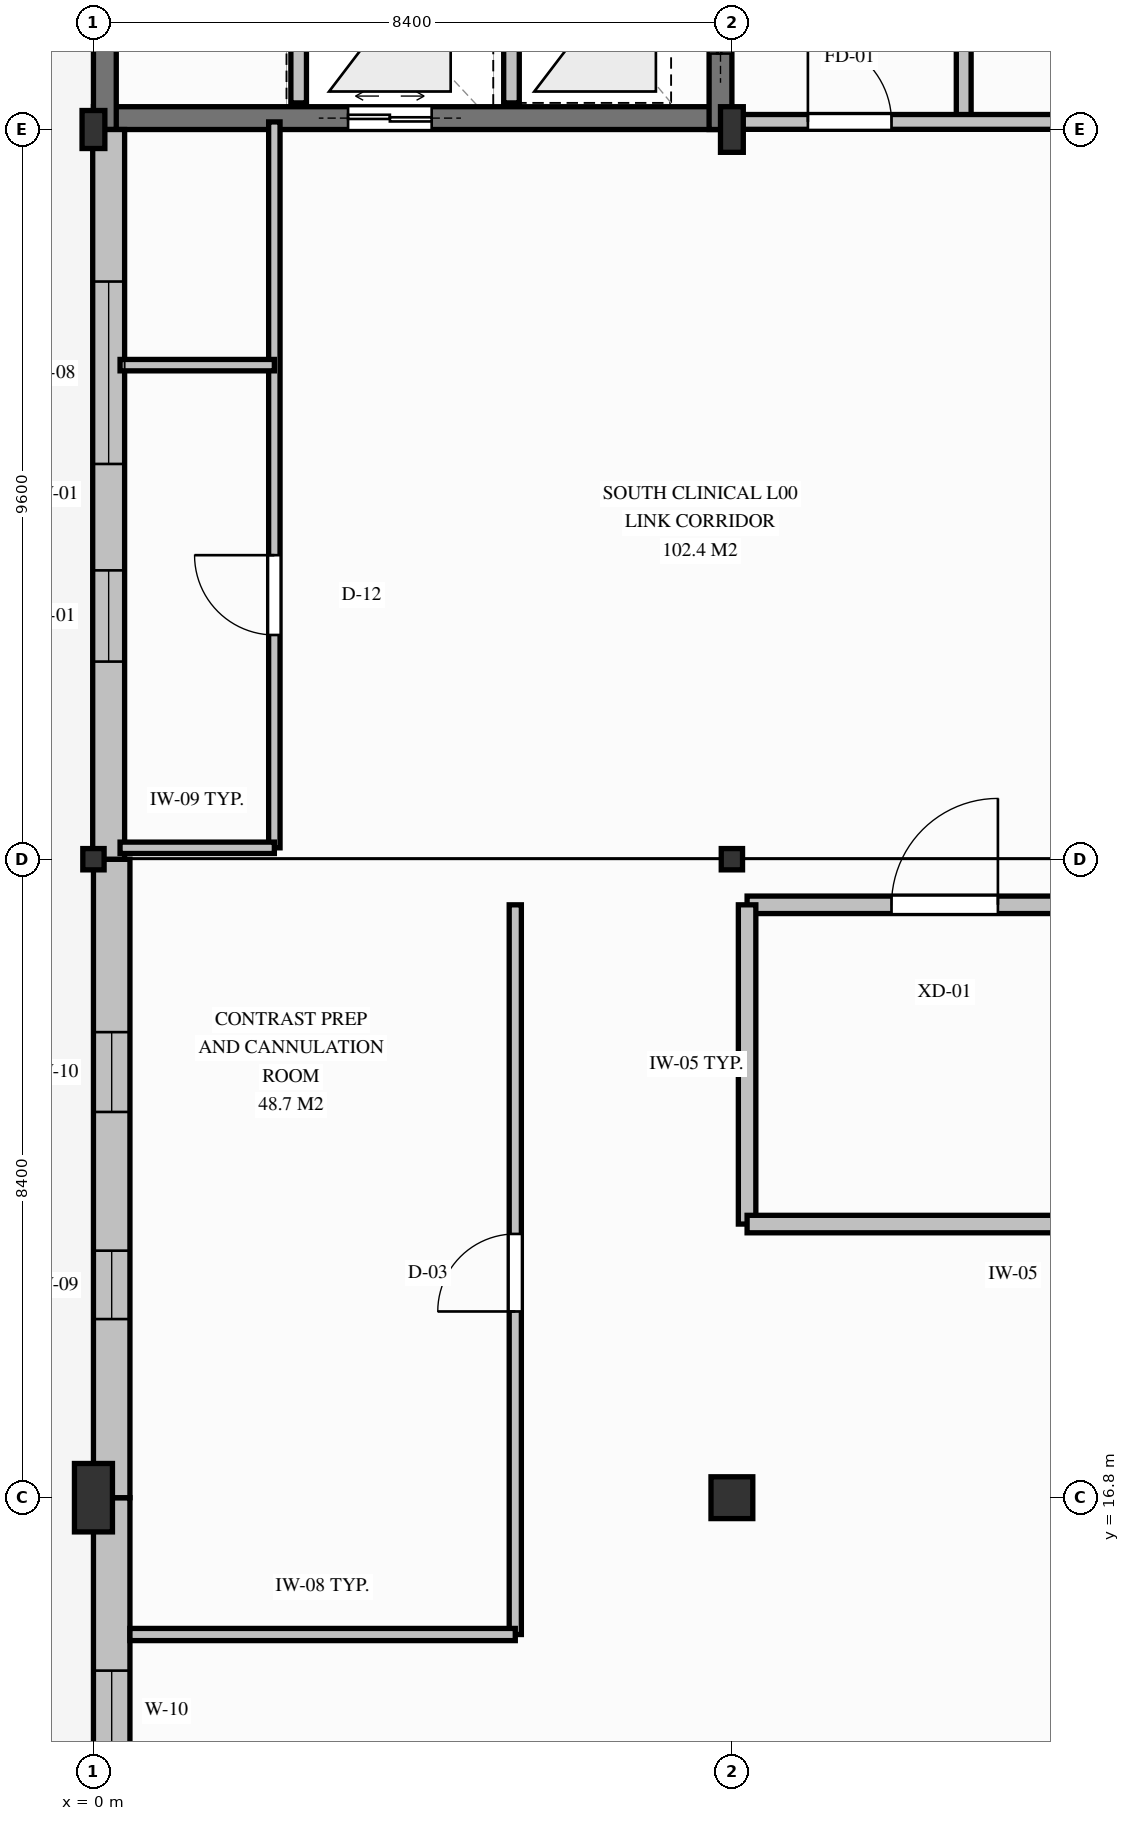
"""IFC4 building model, lengths in metres.
Left out: names, types, materials, properties, quantities, classifications, styles, units other than length and angle.
Written with IfcOpenShell. Run it as: python <this file> out.ifc"""

import sys

from ifc_helpers import new_model, si_unit, direction, frame, frame_2d, origin, origin_2d, place, context, subcontext, project, spatial, rectangle, circle, i_section, extrude, element, fill, save


model = new_model("IFC4")
c1 = context("Model", 3, precision=1e-05, world=origin(), true_north=direction((0.0, 1.0)))
c2 = subcontext(c1, "Body", "Model", "MODEL_VIEW")
j1 = project(units=[si_unit("LENGTHUNIT", "METRE"), si_unit("PLANEANGLEUNIT", "RADIAN")], contexts=[c1])
p1 = place(None, origin())
s1 = spatial("IfcSite", under=j1, at=p1, CompositionType="ELEMENT")
p2 = place(p1, origin())
s2 = spatial("IfcBuilding", under=s1, at=p2, CompositionType="ELEMENT")
p3 = place(p2, origin())
s3 = spatial("IfcBuildingStorey", under=s2, at=p3, CompositionType="ELEMENT", Elevation=0.0)
p4 = place(p3, frame((0.0, 34.95, 0.0), z_axis=(0.0, 0.0, 1.0), x_axis=(1.0, 0.0, 0.0)))
e1 = element("IfcWall", 1, at=p4, inside=s3, PredefinedType="SHEAR", context=c2, shape_type="SweptSolid", body=[
    extrude(rectangle(XDim=8.4, YDim=0.3, at=frame_2d((4.2, 0.0))), origin(), (0.0, 0.0, 1.0), 4.5),
])
p5 = place(p4, frame((3.35, 0.0, 0.0)))
e2 = element("IfcOpeningElement", 2, at=p5, cuts=e1, PredefinedType="OPENING", context=c2, shape_type="SweptSolid", body=[
    extrude(rectangle(XDim=1.1, YDim=2.1, at=frame_2d((0.55, 1.05))), frame((0.0, 0.16, 0.0), z_axis=(0.0, -1.0, 0.0), x_axis=(1.0, 0.0, 0.0)), (0.0, 0.0, 1.0), 0.32),
])
p6 = place(p3, frame((0.15, 34.8, 0.0), z_axis=(0.0, 0.0, 1.0), x_axis=(0.0, 1.0, 0.0)))
e3 = element("IfcWall", 3, at=p6, inside=s3, PredefinedType="SHEAR", context=c2, shape_type="SweptSolid", body=[
    extrude(rectangle(XDim=8.0, YDim=0.3, at=frame_2d((4.0, 0.0))), origin(), (0.0, 0.0, 1.0), 4.5),
])
p7 = place(p6, frame((4.75, 0.0, 0.0)))
e4 = element("IfcOpeningElement", 4, at=p7, cuts=e3, PredefinedType="OPENING", context=c2, shape_type="SweptSolid", body=[
    extrude(rectangle(XDim=1.3, YDim=2.25, at=frame_2d((0.65, 1.125))), frame((0.0, 0.16, 0.0), z_axis=(0.0, -1.0, 0.0), x_axis=(1.0, 0.0, 0.0)), (0.0, 0.0, 1.0), 0.32),
])
p8 = place(p3, frame((8.25, 34.8, 0.0), z_axis=(0.0, 0.0, 1.0), x_axis=(0.0, 1.0, 0.0)))
e5 = element("IfcWall", 5, at=p8, inside=s3, PredefinedType="SHEAR", context=c2, shape_type="SweptSolid", body=[
    extrude(rectangle(XDim=8.0, YDim=0.3, at=frame_2d((4.0, 0.0))), origin(), (0.0, 0.0, 1.0), 4.5),
])
p9 = place(p8, frame((2.95, 0.0, 0.0)))
e6 = element("IfcOpeningElement", 6, at=p9, cuts=e5, PredefinedType="OPENING", context=c2, shape_type="SweptSolid", body=[
    extrude(rectangle(XDim=1.1, YDim=2.15, at=frame_2d((0.55, 1.075))), frame((0.0, 0.16, 0.0), z_axis=(0.0, -1.0, 0.0), x_axis=(1.0, 0.0, 0.0)), (0.0, 0.0, 1.0), 0.32),
])
p10 = place(p8, frame((1.0, 0.0, 0.0)))
e7 = element("IfcOpeningElement", 7, at=p10, cuts=e5, PredefinedType="OPENING", context=c2, shape_type="SweptSolid", body=[
    extrude(rectangle(XDim=1.1, YDim=2.1, at=frame_2d((0.55, 1.05))), frame((0.0, 0.16, 0.0), z_axis=(0.0, -1.0, 0.0), x_axis=(1.0, 0.0, 0.0)), (0.0, 0.0, 1.0), 0.32),
])
p11 = place(p3, frame((0.0, 16.8, 0.0), z_axis=(0.0, 0.0, 1.0), x_axis=(1.0, 0.0, 0.0)))
e8 = element("IfcColumn", 8, at=p11, inside=s3, PredefinedType="COLUMN", context=c2, shape_type="SweptSolid", body=[
    extrude(rectangle(XDim=0.5, YDim=0.9, at=origin_2d()), origin(), (0.0, 0.0, 1.0), 4.5),
])
p12 = place(p3, frame((0.0, 25.2, 0.0), z_axis=(0.0, 0.0, 1.0), x_axis=(1.0, 0.0, 0.0)))
e9 = element("IfcColumn", 9, at=p12, inside=s3, PredefinedType="COLUMN", context=c2, shape_type="SweptSolid", body=[
    extrude(i_section(OverallWidth=0.28, OverallDepth=0.28, WebThickness=0.01, FlangeThickness=0.018, FilletRadius=0.024, at=origin_2d()), origin(), (0.0, 0.0, 1.0), 4.5),
])
p13 = place(p3, frame((0.0, 34.8, 0.0), z_axis=(0.0, 0.0, 1.0), x_axis=(1.0, 0.0, 0.0)))
e10 = element("IfcColumn", 10, at=p13, inside=s3, PredefinedType="COLUMN", context=c2, shape_type="SweptSolid", body=[
    extrude(i_section(OverallWidth=0.3, OverallDepth=0.5, WebThickness=0.014, FlangeThickness=0.028, FilletRadius=0.027, at=origin_2d()), origin(), (0.0, 0.0, 1.0), 4.5),
])
p14 = place(p3, frame((8.4, 16.8, 0.0), z_axis=(0.0, 0.0, 1.0), x_axis=(1.0, 0.0, 0.0)))
e11 = element("IfcColumn", 11, at=p14, inside=s3, PredefinedType="COLUMN", context=c2, shape_type="SweptSolid", body=[
    extrude(circle(Radius=0.275, at=origin_2d()), origin(), (0.0, 0.0, 1.0), 4.5),
])
p15 = place(p3, frame((8.4, 25.2, 0.0), z_axis=(0.0, 0.0, 1.0), x_axis=(1.0, 0.0, 0.0)))
e12 = element("IfcColumn", 12, at=p15, inside=s3, PredefinedType="COLUMN", context=c2, shape_type="SweptSolid", body=[
    extrude(i_section(OverallWidth=0.28, OverallDepth=0.28, WebThickness=0.01, FlangeThickness=0.018, FilletRadius=0.024, at=origin_2d()), origin(), (0.0, 0.0, 1.0), 4.5),
])
p16 = place(p3, frame((8.4, 34.8, 0.0), z_axis=(0.0, 0.0, 1.0), x_axis=(1.0, 0.0, 0.0)))
e13 = element("IfcColumn", 13, at=p16, inside=s3, PredefinedType="COLUMN", context=c2, shape_type="SweptSolid", body=[
    extrude(i_section(OverallWidth=0.3, OverallDepth=0.6, WebThickness=0.015, FlangeThickness=0.03, FilletRadius=0.027, at=origin_2d()), origin(), (0.0, 0.0, 1.0), 4.5),
])
p17 = place(p3, frame((0.24, 8.4, 0.0), z_axis=(0.0, 0.0, 1.0), x_axis=(0.0, 1.0, 0.0)))
e14 = element("IfcWall", 14, at=p17, inside=s3, PredefinedType="SOLIDWALL", context=c2, shape_type="SweptSolid", body=[
    extrude(rectangle(XDim=8.4, YDim=0.48, at=frame_2d((4.2, 0.0))), origin(), (0.0, 0.0, 1.0), 3.773),
])
p18 = place(p17, frame((2.35, 0.0, 0.85)))
e15 = element("IfcOpeningElement", 15, at=p18, cuts=e14, PredefinedType="OPENING", context=c2, shape_type="SweptSolid", body=[
    extrude(rectangle(XDim=0.9, YDim=1.8, at=frame_2d((0.45, 0.9))), frame((0.0, 0.25, 0.0), z_axis=(0.0, -1.0, 0.0), x_axis=(1.0, 0.0, 0.0)), (0.0, 0.0, 1.0), 0.5),
])
p19 = place(p17, frame((5.075, 0.0, 0.85)))
e16 = element("IfcOpeningElement", 16, at=p19, cuts=e14, PredefinedType="OPENING", context=c2, shape_type="SweptSolid", body=[
    extrude(rectangle(XDim=1.05, YDim=1.75, at=frame_2d((0.525, 0.875))), frame((0.0, 0.25, 0.0), z_axis=(0.0, -1.0, 0.0), x_axis=(1.0, 0.0, 0.0)), (0.0, 0.0, 1.0), 0.5),
])
p20 = place(p3, frame((0.24, 16.8, 0.0), z_axis=(0.0, 0.0, 1.0), x_axis=(0.0, 1.0, 0.0)))
e17 = element("IfcWall", 17, at=p20, inside=s3, PredefinedType="SOLIDWALL", context=c2, shape_type="SweptSolid", body=[
    extrude(rectangle(XDim=8.4, YDim=0.48, at=frame_2d((4.2, 0.0))), origin(), (0.0, 0.0, 1.0), 3.943),
])
p21 = place(p20, frame((2.35, 0.0, 0.85)))
e18 = element("IfcOpeningElement", 18, at=p21, cuts=e17, PredefinedType="OPENING", context=c2, shape_type="SweptSolid", body=[
    extrude(rectangle(XDim=0.9, YDim=1.8, at=frame_2d((0.45, 0.9))), frame((0.0, 0.25, 0.0), z_axis=(0.0, -1.0, 0.0), x_axis=(1.0, 0.0, 0.0)), (0.0, 0.0, 1.0), 0.5),
])
p22 = place(p20, frame((5.075, 0.0, 0.85)))
e19 = element("IfcOpeningElement", 19, at=p22, cuts=e17, PredefinedType="OPENING", context=c2, shape_type="SweptSolid", body=[
    extrude(rectangle(XDim=1.05, YDim=1.75, at=frame_2d((0.525, 0.875))), frame((0.0, 0.25, 0.0), z_axis=(0.0, -1.0, 0.0), x_axis=(1.0, 0.0, 0.0)), (0.0, 0.0, 1.0), 0.5),
])
p23 = place(p3, frame((0.2, 25.2, 0.0), z_axis=(0.0, 0.0, 1.0), x_axis=(0.0, 1.0, 0.0)))
e20 = element("IfcWall", 20, at=p23, inside=s3, PredefinedType="SOLIDWALL", context=c2, shape_type="SweptSolid", body=[
    extrude(rectangle(XDim=9.6, YDim=0.42, at=frame_2d((4.8, 0.0))), origin(), (0.0, 0.0, 1.0), 3.978),
])
p24 = place(p23, frame((2.6, 0.0, 0.85)))
e21 = element("IfcOpeningElement", 21, at=p24, cuts=e20, PredefinedType="OPENING", context=c2, shape_type="SweptSolid", body=[
    extrude(rectangle(XDim=1.2, YDim=1.8, at=frame_2d((0.6, 0.9))), frame((0.0, 0.22, 0.0), z_axis=(0.0, -1.0, 0.0), x_axis=(1.0, 0.0, 0.0)), (0.0, 0.0, 1.0), 0.44),
])
p25 = place(p23, frame((5.2, 0.0, 0.85)))
e22 = element("IfcOpeningElement", 22, at=p25, cuts=e20, PredefinedType="OPENING", context=c2, shape_type="SweptSolid", body=[
    extrude(rectangle(XDim=2.4, YDim=2.05, at=frame_2d((1.2, 1.025))), frame((0.0, 0.22, 0.0), z_axis=(0.0, -1.0, 0.0), x_axis=(1.0, 0.0, 0.0)), (0.0, 0.0, 1.0), 0.44),
])
for number, where, z_axis, x_axis in (
    (23, (5.5, 35.15, 0.0), (0.0, 0.0, 1.0), (0.0, 1.0, 0.0)),
    (24, (2.7, 35.15, 0.0), (0.0, 0.0, 1.0), (0.0, 1.0, 0.0)),
):
    element("IfcWall", number, at=place(p3, frame(where, z_axis=z_axis, x_axis=x_axis)), inside=s3, PredefinedType="PARTITIONING", context=c2, shape_type="SweptSolid", body=[
        extrude(rectangle(XDim=2.4, YDim=0.205, at=frame_2d((1.2, 0.0))), origin(), (0.0, 0.0, 1.0), 4.23),
    ])
p26 = place(p3, frame((11.45, 34.9, 0.0), z_axis=(0.0, 0.0, 1.0), x_axis=(0.0, 1.0, 0.0)))
e25 = element("IfcWall", 25, at=p26, inside=s3, PredefinedType="PARTITIONING", context=c2, shape_type="SweptSolid", body=[
    extrude(rectangle(XDim=2.65, YDim=0.195, at=frame_2d((1.325, 0.0))), origin(), (0.0, 0.0, 1.0), 3.928),
])
p27 = place(p3, frame((8.35, 34.9, 0.0), z_axis=(0.0, 0.0, 1.0), x_axis=(1.0, 0.0, 0.0)))
e26 = element("IfcWall", 26, at=p27, inside=s3, PredefinedType="PARTITIONING", context=c2, shape_type="SweptSolid", body=[
    extrude(rectangle(XDim=4.8, YDim=0.195, at=frame_2d((2.4, 0.0))), origin(), (0.0, 0.0, 1.0), 3.678),
])
p28 = place(p27, frame((1.05, 0.0, 0.0)))
e27 = element("IfcOpeningElement", 27, at=p28, cuts=e26, PredefinedType="OPENING", context=c2, shape_type="SweptSolid", body=[
    extrude(rectangle(XDim=1.1, YDim=2.15, at=frame_2d((0.55, 1.075))), frame((0.0, 0.107, 0.0), z_axis=(0.0, -1.0, 0.0), x_axis=(1.0, 0.0, 0.0)), (0.0, 0.0, 1.0), 0.215),
])
p29 = place(p3, frame((2.38, 25.35, 0.0), z_axis=(0.0, 0.0, 1.0), x_axis=(0.0, 1.0, 0.0)))
e28 = element("IfcWall", 28, at=p29, inside=s3, PredefinedType="PARTITIONING", context=c2, shape_type="SweptSolid", body=[
    extrude(rectangle(XDim=9.55, YDim=0.15, at=frame_2d((4.775, 0.0))), origin(), (0.0, 0.0, 1.0), 3.978),
])
p30 = place(p29, frame((2.8, 0.0, 0.0)))
e29 = element("IfcOpeningElement", 29, at=p30, cuts=e28, PredefinedType="OPENING", context=c2, shape_type="SweptSolid", body=[
    extrude(rectangle(XDim=1.05, YDim=2.15, at=frame_2d((0.525, 1.075))), frame((0.0, 0.085, 0.0), z_axis=(0.0, -1.0, 0.0), x_axis=(1.0, 0.0, 0.0)), (0.0, 0.0, 1.0), 0.17),
])
p31 = place(p3, frame((0.35, 25.35, 0.0), z_axis=(0.0, 0.0, 1.0), x_axis=(1.0, 0.0, 0.0)))
e30 = element("IfcWall", 30, at=p31, inside=s3, PredefinedType="PARTITIONING", context=c2, shape_type="SweptSolid", body=[
    extrude(rectangle(XDim=2.03, YDim=0.15, at=frame_2d((1.015, 0.0))), origin(), (0.0, 0.0, 1.0), 3.978),
])
p32 = place(p3, frame((0.35, 31.7, 0.0), z_axis=(0.0, 0.0, 1.0), x_axis=(1.0, 0.0, 0.0)))
e31 = element("IfcWall", 31, at=p32, inside=s3, PredefinedType="PARTITIONING", context=c2, shape_type="SweptSolid", body=[
    extrude(rectangle(XDim=2.03, YDim=0.15, at=frame_2d((1.015, 0.0))), origin(), (0.0, 0.0, 1.0), 4.23),
])
p33 = place(p3, frame((8.6, 24.6, 0.0), z_axis=(0.0, 0.0, 1.0), x_axis=(1.0, 0.0, 0.0)))
e32 = element("IfcWall", 32, at=p33, inside=s3, PredefinedType="PARTITIONING", context=c2, shape_type="SweptSolid", body=[
    extrude(rectangle(XDim=7.0, YDim=0.23, at=frame_2d((3.5, 0.0))), origin(), (0.0, 0.0, 1.0), 3.933),
])
p34 = place(p33, frame((1.9, 0.0, 0.0)))
e33 = element("IfcOpeningElement", 33, at=p34, cuts=e32, PredefinedType="OPENING", context=c2, shape_type="SweptSolid", body=[
    extrude(rectangle(XDim=1.4, YDim=2.2, at=frame_2d((0.7, 1.1))), frame((0.0, 0.125, 0.0), z_axis=(0.0, -1.0, 0.0), x_axis=(1.0, 0.0, 0.0)), (0.0, 0.0, 1.0), 0.25),
])
p35 = place(p3, frame((8.6, 20.4, 0.0), z_axis=(0.0, 0.0, 1.0), x_axis=(0.0, 1.0, 0.0)))
e34 = element("IfcWall", 34, at=p35, inside=s3, PredefinedType="PARTITIONING", context=c2, shape_type="SweptSolid", body=[
    extrude(rectangle(XDim=4.2, YDim=0.23, at=frame_2d((2.1, 0.0))), origin(), (0.0, 0.0, 1.0), 3.933),
])
p36 = place(p3, frame((15.6, 20.4, 0.0), z_axis=(0.0, 0.0, 1.0), x_axis=(-1.0, 0.0, 0.0)))
e35 = element("IfcWall", 35, at=p36, inside=s3, PredefinedType="PARTITIONING", context=c2, shape_type="SweptSolid", body=[
    extrude(rectangle(XDim=7.0, YDim=0.23, at=frame_2d((3.5, 0.0))), origin(), (0.0, 0.0, 1.0), 3.933),
])
p37 = place(p3, frame((5.55, 15.0, 0.0), z_axis=(0.0, 0.0, 1.0), x_axis=(0.0, 1.0, 0.0)))
e36 = element("IfcWall", 36, at=p37, inside=s3, PredefinedType="PARTITIONING", context=c2, shape_type="SweptSolid", body=[
    extrude(rectangle(XDim=9.6, YDim=0.16, at=frame_2d((4.8, 0.0))), origin(), (0.0, 0.0, 1.0), 3.943),
])
p38 = place(p37, frame((4.25, 0.0, 0.0)))
e37 = element("IfcOpeningElement", 37, at=p38, cuts=e36, PredefinedType="OPENING", context=c2, shape_type="SweptSolid", body=[
    extrude(rectangle(XDim=1.02, YDim=2.15, at=frame_2d((0.51, 1.075))), frame((0.0, 0.09, 0.0), z_axis=(0.0, -1.0, 0.0), x_axis=(1.0, 0.0, 0.0)), (0.0, 0.0, 1.0), 0.18),
])
p39 = place(p3, frame((0.48, 15.0, 0.0), z_axis=(0.0, 0.0, 1.0), x_axis=(1.0, 0.0, 0.0)))
e38 = element("IfcWall", 38, at=p39, inside=s3, PredefinedType="PARTITIONING", context=c2, shape_type="SweptSolid", body=[
    extrude(rectangle(XDim=5.07, YDim=0.16, at=frame_2d((2.535, 0.0))), origin(), (0.0, 0.0, 1.0), 4.23),
])
p40 = place(p19, origin())
e39 = element("IfcWindow", 39, at=p40, inside=s3, PartitioningType="SINGLE_PANEL", PredefinedType="WINDOW", context=c2, shape_type="SweptSolid", body=[
    extrude(rectangle(XDim=1.05, YDim=1.75, at=frame_2d((0.525, 0.875))), frame((0.0, 0.03, 0.0), z_axis=(0.0, -1.0, 0.0), x_axis=(1.0, 0.0, 0.0)), (0.0, 0.0, 1.0), 0.06),
])
fill(e16, e39)
p41 = place(p21, origin())
e40 = element("IfcWindow", 40, at=p41, inside=s3, PartitioningType="SINGLE_PANEL", PredefinedType="WINDOW", context=c2, shape_type="SweptSolid", body=[
    extrude(rectangle(XDim=0.9, YDim=1.8, at=frame_2d((0.45, 0.9))), frame((0.0, 0.03, 0.0), z_axis=(0.0, -1.0, 0.0), x_axis=(1.0, 0.0, 0.0)), (0.0, 0.0, 1.0), 0.06),
])
fill(e18, e40)
p42 = place(p22, origin())
e41 = element("IfcWindow", 41, at=p42, inside=s3, PartitioningType="SINGLE_PANEL", PredefinedType="WINDOW", context=c2, shape_type="SweptSolid", body=[
    extrude(rectangle(XDim=1.05, YDim=1.75, at=frame_2d((0.525, 0.875))), frame((0.0, 0.03, 0.0), z_axis=(0.0, -1.0, 0.0), x_axis=(1.0, 0.0, 0.0)), (0.0, 0.0, 1.0), 0.06),
])
fill(e19, e41)
p43 = place(p24, origin())
e42 = element("IfcWindow", 42, at=p43, inside=s3, PartitioningType="SINGLE_PANEL", PredefinedType="WINDOW", context=c2, shape_type="SweptSolid", body=[
    extrude(rectangle(XDim=1.2, YDim=1.8, at=frame_2d((0.6, 0.9))), frame((0.0, 0.03, 0.0), z_axis=(0.0, -1.0, 0.0), x_axis=(1.0, 0.0, 0.0)), (0.0, 0.0, 1.0), 0.06),
])
fill(e21, e42)
p44 = place(p25, origin())
e43 = element("IfcWindow", 43, at=p44, inside=s3, PartitioningType="SINGLE_PANEL", PredefinedType="WINDOW", context=c2, shape_type="SweptSolid", body=[
    extrude(rectangle(XDim=2.4, YDim=2.05, at=frame_2d((1.2, 1.025))), frame((0.0, 0.03, 0.0), z_axis=(0.0, -1.0, 0.0), x_axis=(1.0, 0.0, 0.0)), (0.0, 0.0, 1.0), 0.06),
])
fill(e22, e43)
p45 = place(p10, origin())
e44 = element("IfcDoor", 44, at=p45, inside=s3, OperationType="DOUBLE_DOOR_SLIDING", PredefinedType="DOOR", context=c2, shape_type="SweptSolid", body=[
    extrude(rectangle(XDim=1.1, YDim=2.1, at=frame_2d((0.55, 1.05))), frame((0.0, 0.025, 0.0), z_axis=(0.0, -1.0, 0.0), x_axis=(1.0, 0.0, 0.0)), (0.0, 0.0, 1.0), 0.05),
])
fill(e7, e44)
p46 = place(p5, origin())
e45 = element("IfcDoor", 45, at=p46, inside=s3, OperationType="DOUBLE_DOOR_SLIDING", PredefinedType="DOOR", context=c2, shape_type="SweptSolid", body=[
    extrude(rectangle(XDim=1.1, YDim=2.1, at=frame_2d((0.55, 1.05))), frame((0.0, 0.025, 0.0), z_axis=(0.0, -1.0, 0.0), x_axis=(1.0, 0.0, 0.0)), (0.0, 0.0, 1.0), 0.05),
])
fill(e2, e45)
p47 = place(p28, origin())
e46 = element("IfcDoor", 46, at=p47, inside=s3, OperationType="SINGLE_SWING_LEFT", PredefinedType="DOOR", context=c2, shape_type="SweptSolid", body=[
    extrude(rectangle(XDim=1.1, YDim=2.15, at=frame_2d((0.55, 1.075))), frame((0.0, 0.025, 0.0), z_axis=(0.0, -1.0, 0.0), x_axis=(1.0, 0.0, 0.0)), (0.0, 0.0, 1.0), 0.05),
])
fill(e27, e46)
p48 = place(p30, origin())
e47 = element("IfcDoor", 47, at=p48, inside=s3, OperationType="SINGLE_SWING_RIGHT", PredefinedType="DOOR", context=c2, shape_type="SweptSolid", body=[
    extrude(rectangle(XDim=1.05, YDim=2.15, at=frame_2d((0.525, 1.075))), frame((0.0, 0.025, 0.0), z_axis=(0.0, -1.0, 0.0), x_axis=(1.0, 0.0, 0.0)), (0.0, 0.0, 1.0), 0.05),
])
fill(e29, e47)
p49 = place(p34, origin())
e48 = element("IfcDoor", 48, at=p49, inside=s3, OperationType="SINGLE_SWING_RIGHT", PredefinedType="DOOR", context=c2, shape_type="SweptSolid", body=[
    extrude(rectangle(XDim=1.4, YDim=2.2, at=frame_2d((0.7, 1.1))), frame((0.0, 0.025, 0.0), z_axis=(0.0, -1.0, 0.0), x_axis=(1.0, 0.0, 0.0)), (0.0, 0.0, 1.0), 0.05),
])
fill(e33, e48)
p50 = place(p38, origin())
e49 = element("IfcDoor", 49, at=p50, inside=s3, OperationType="SINGLE_SWING_LEFT", PredefinedType="DOOR", context=c2, shape_type="SweptSolid", body=[
    extrude(rectangle(XDim=1.02, YDim=2.15, at=frame_2d((0.51, 1.075))), frame((0.0, 0.025, 0.0), z_axis=(0.0, -1.0, 0.0), x_axis=(1.0, 0.0, 0.0)), (0.0, 0.0, 1.0), 0.05),
])
fill(e37, e49)
save(model, sys.argv[1])
